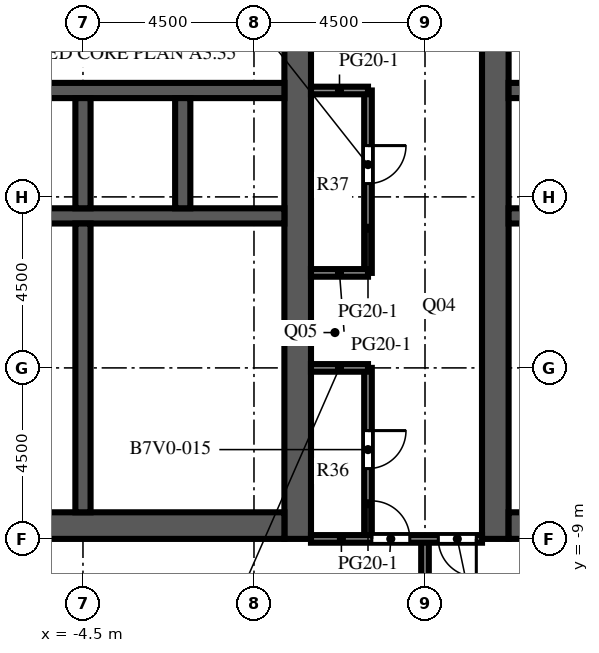
"""IFC4 building model, lengths in metres.
Left out: names, types, materials, properties, quantities, classifications, styles, units other than length and angle.
Written with IfcOpenShell. Run it as: python <this file> out.ifc"""

import sys

from ifc_helpers import new_model, si_unit, direction, frame, frame_2d, origin, place, context, subcontext, project, spatial, rectangle, extrude, element, fill, save


model = new_model("IFC4")
c1 = context("Model", 3, precision=1e-05, world=origin(), true_north=direction((0.0, 1.0)))
c2 = subcontext(c1, "Body", "Model", "MODEL_VIEW")
j1 = project(units=[si_unit("LENGTHUNIT", "METRE"), si_unit("PLANEANGLEUNIT", "RADIAN")], contexts=[c1])
p1 = place(None, origin())
s1 = spatial("IfcSite", under=j1, at=p1, CompositionType="ELEMENT")
p2 = place(p1, origin())
s2 = spatial("IfcBuilding", under=s1, at=p2, CompositionType="ELEMENT")
p3 = place(p2, frame((0.0, 0.0, 235.7)))
s3 = spatial("IfcBuildingStorey", under=s2, at=p3, CompositionType="ELEMENT", Elevation=235.7)
p4 = place(p3, frame((1.15, -9.0, 0.0), z_axis=(0.0, 0.0, 1.0), x_axis=(0.0, 1.0, 0.0)))
e1 = element("IfcWall", 1, at=p4, inside=s3, PredefinedType="SHEAR", context=c2, shape_type="SweptSolid", body=[
    extrude(rectangle(XDim=27.5, YDim=0.7, at=frame_2d((13.75, 0.0))), origin(), (0.0, 0.0, 1.0), 4.1),
])
p5 = place(p4, frame((12.55, 0.0, 0.0)))
e2 = element("IfcOpeningElement", 2, at=p5, cuts=e1, PredefinedType="OPENING", context=c2, shape_type="SweptSolid", body=[
    extrude(rectangle(XDim=2.4, YDim=2.4, at=frame_2d((1.2, 1.2))), frame((0.0, 0.36, 0.0), z_axis=(0.0, -1.0, 0.0), x_axis=(1.0, 0.0, 0.0)), (0.0, 0.0, 1.0), 0.72),
])
p6 = place(p4, frame((5.42, 0.0, 0.0)))
e3 = element("IfcOpeningElement", 3, at=p6, cuts=e1, PredefinedType="OPENING", context=c2, shape_type="SweptSolid", body=[
    extrude(rectangle(XDim=1.2, YDim=2.1, at=frame_2d((0.6, 1.05))), frame((0.0, 0.36, 0.0), z_axis=(0.0, -1.0, 0.0), x_axis=(1.0, 0.0, 0.0)), (0.0, 0.0, 1.0), 0.72),
])
p7 = place(p4, frame((19.46, 0.0, 0.0)))
e4 = element("IfcOpeningElement", 4, at=p7, cuts=e1, PredefinedType="OPENING", context=c2, shape_type="SweptSolid", body=[
    extrude(rectangle(XDim=1.0, YDim=2.1, at=frame_2d((0.5, 1.05))), frame((0.0, 0.36, 0.0), z_axis=(0.0, -1.0, 0.0), x_axis=(1.0, 0.0, 0.0)), (0.0, 0.0, 1.0), 0.72),
])
p8 = place(p4, frame((21.17, 0.0, 0.0)))
e5 = element("IfcOpeningElement", 5, at=p8, cuts=e1, PredefinedType="OPENING", context=c2, shape_type="SweptSolid", body=[
    extrude(rectangle(XDim=1.0, YDim=2.1, at=frame_2d((0.5, 1.05))), frame((0.0, 0.36, 0.0), z_axis=(0.0, -1.0, 0.0), x_axis=(1.0, 0.0, 0.0)), (0.0, 0.0, 1.0), 0.72),
])
p9 = place(p4, frame((23.26, 0.0, 0.0)))
e6 = element("IfcOpeningElement", 6, at=p9, cuts=e1, PredefinedType="OPENING", context=c2, shape_type="SweptSolid", body=[
    extrude(rectangle(XDim=1.0, YDim=2.1, at=frame_2d((0.5, 1.05))), frame((0.0, 0.36, 0.0), z_axis=(0.0, -1.0, 0.0), x_axis=(1.0, 0.0, 0.0)), (0.0, 0.0, 1.0), 0.72),
])
p10 = place(p4, frame((25.35, 0.0, 0.0)))
e7 = element("IfcOpeningElement", 7, at=p10, cuts=e1, PredefinedType="OPENING", context=c2, shape_type="SweptSolid", body=[
    extrude(rectangle(XDim=1.0, YDim=2.1, at=frame_2d((0.5, 1.05))), frame((0.0, 0.36, 0.0), z_axis=(0.0, -1.0, 0.0), x_axis=(1.0, 0.0, 0.0)), (0.0, 0.0, 1.0), 0.72),
])
p11 = place(p3, frame((-9.8, -8.65, 0.0), z_axis=(0.0, 0.0, 1.0), x_axis=(1.0, 0.0, 0.0)))
e8 = element("IfcWall", 8, at=p11, inside=s3, PredefinedType="SHEAR", context=c2, shape_type="SweptSolid", body=[
    extrude(rectangle(XDim=10.6, YDim=0.7, at=frame_2d((5.3, 0.0))), origin(), (0.0, 0.0, 1.0), 4.1),
])
p12 = place(p3, frame((-9.8, -0.5, 0.0), z_axis=(0.0, 0.0, 1.0), x_axis=(1.0, 0.0, 0.0)))
e9 = element("IfcWall", 9, at=p12, inside=s3, PredefinedType="SHEAR", context=c2, shape_type="SweptSolid", body=[
    extrude(rectangle(XDim=10.6, YDim=0.4, at=frame_2d((5.3, 0.0))), origin(), (0.0, 0.0, 1.0), 4.1),
])
p13 = place(p3, frame((-9.8, 2.8, 0.0), z_axis=(0.0, 0.0, 1.0), x_axis=(1.0, 0.0, 0.0)))
e10 = element("IfcWall", 10, at=p13, inside=s3, PredefinedType="SHEAR", context=c2, shape_type="SweptSolid", body=[
    extrude(rectangle(XDim=10.6, YDim=0.4, at=frame_2d((5.3, 0.0))), origin(), (0.0, 0.0, 1.0), 4.1),
])
p14 = place(p13, frame((0.688, 0.0, 0.0)))
e11 = element("IfcOpeningElement", 11, at=p14, cuts=e10, PredefinedType="OPENING", context=c2, shape_type="SweptSolid", body=[
    extrude(rectangle(XDim=1.1, YDim=2.1, at=frame_2d((0.55, 1.05))), frame((0.0, 0.21, 0.0), z_axis=(0.0, -1.0, 0.0), x_axis=(1.0, 0.0, 0.0)), (0.0, 0.0, 1.0), 0.42),
])
p15 = place(p13, frame((3.438, 0.0, 0.0)))
e12 = element("IfcOpeningElement", 12, at=p15, cuts=e10, PredefinedType="OPENING", context=c2, shape_type="SweptSolid", body=[
    extrude(rectangle(XDim=1.1, YDim=2.1, at=frame_2d((0.55, 1.05))), frame((0.0, 0.21, 0.0), z_axis=(0.0, -1.0, 0.0), x_axis=(1.0, 0.0, 0.0)), (0.0, 0.0, 1.0), 0.42),
])
p16 = place(p13, frame((6.113, 0.0, 0.0)))
e13 = element("IfcOpeningElement", 13, at=p16, cuts=e10, PredefinedType="OPENING", context=c2, shape_type="SweptSolid", body=[
    extrude(rectangle(XDim=1.0, YDim=2.1, at=frame_2d((0.5, 1.05))), frame((0.0, 0.21, 0.0), z_axis=(0.0, -1.0, 0.0), x_axis=(1.0, 0.0, 0.0)), (0.0, 0.0, 1.0), 0.42),
])
p17 = place(p13, frame((8.863, 0.0, 0.0)))
e14 = element("IfcOpeningElement", 14, at=p17, cuts=e10, PredefinedType="OPENING", context=c2, shape_type="SweptSolid", body=[
    extrude(rectangle(XDim=1.0, YDim=2.1, at=frame_2d((0.5, 1.05))), frame((0.0, 0.21, 0.0), z_axis=(0.0, -1.0, 0.0), x_axis=(1.0, 0.0, 0.0)), (0.0, 0.0, 1.0), 0.42),
])
for number, where, z_axis, x_axis in (
    (15, (-4.5, -0.3, 0.0), (0.0, 0.0, 1.0), (0.0, 1.0, 0.0)),
    (16, (-1.875, -0.3, 0.0), (0.0, 0.0, 1.0), (0.0, 1.0, 0.0)),
):
    element("IfcWall", number, at=place(p3, frame(where, z_axis=z_axis, x_axis=x_axis)), inside=s3, PredefinedType="SHEAR", context=c2, shape_type="SweptSolid", body=[
        extrude(rectangle(XDim=2.9, YDim=0.4, at=frame_2d((1.45, 0.0))), origin(), (0.0, 0.0, 1.0), 4.1),
    ])
p18 = place(p3, frame((-4.5, -8.3, 0.0), z_axis=(0.0, 0.0, 1.0), x_axis=(0.0, 1.0, 0.0)))
e17 = element("IfcWall", 17, at=p18, inside=s3, PredefinedType="SHEAR", context=c2, shape_type="SweptSolid", body=[
    extrude(rectangle(XDim=7.6, YDim=0.4, at=frame_2d((3.8, 0.0))), origin(), (0.0, 0.0, 1.0), 4.1),
])
p19 = place(p3, frame((6.35, -9.0, 0.0), z_axis=(0.0, 0.0, 1.0), x_axis=(0.0, 1.0, 0.0)))
e18 = element("IfcWall", 18, at=p19, inside=s3, PredefinedType="SHEAR", context=c2, shape_type="SweptSolid", body=[
    extrude(rectangle(XDim=27.5, YDim=0.7, at=frame_2d((13.75, 0.0))), origin(), (0.0, 0.0, 1.0), 4.1),
])
p20 = place(p19, frame((12.55, 0.0, 0.0)))
e19 = element("IfcOpeningElement", 19, at=p20, cuts=e18, PredefinedType="OPENING", context=c2, shape_type="SweptSolid", body=[
    extrude(rectangle(XDim=2.4, YDim=2.4, at=frame_2d((1.2, 1.2))), frame((0.0, 0.36, 0.0), z_axis=(0.0, -1.0, 0.0), x_axis=(1.0, 0.0, 0.0)), (0.0, 0.0, 1.0), 0.72),
])
p21 = place(p19, frame((5.42, 0.0, 0.0)))
e20 = element("IfcOpeningElement", 20, at=p21, cuts=e18, PredefinedType="OPENING", context=c2, shape_type="SweptSolid", body=[
    extrude(rectangle(XDim=1.2, YDim=2.1, at=frame_2d((0.6, 1.05))), frame((0.0, 0.36, 0.0), z_axis=(0.0, -1.0, 0.0), x_axis=(1.0, 0.0, 0.0)), (0.0, 0.0, 1.0), 0.72),
])
p22 = place(p19, frame((19.46, 0.0, 0.0)))
e21 = element("IfcOpeningElement", 21, at=p22, cuts=e18, PredefinedType="OPENING", context=c2, shape_type="SweptSolid", body=[
    extrude(rectangle(XDim=1.0, YDim=2.1, at=frame_2d((0.5, 1.05))), frame((0.0, 0.36, 0.0), z_axis=(0.0, -1.0, 0.0), x_axis=(1.0, 0.0, 0.0)), (0.0, 0.0, 1.0), 0.72),
])
p23 = place(p19, frame((21.17, 0.0, 0.0)))
e22 = element("IfcOpeningElement", 22, at=p23, cuts=e18, PredefinedType="OPENING", context=c2, shape_type="SweptSolid", body=[
    extrude(rectangle(XDim=1.0, YDim=2.1, at=frame_2d((0.5, 1.05))), frame((0.0, 0.36, 0.0), z_axis=(0.0, -1.0, 0.0), x_axis=(1.0, 0.0, 0.0)), (0.0, 0.0, 1.0), 0.72),
])
p24 = place(p19, frame((23.26, 0.0, 0.0)))
e23 = element("IfcOpeningElement", 23, at=p24, cuts=e18, PredefinedType="OPENING", context=c2, shape_type="SweptSolid", body=[
    extrude(rectangle(XDim=1.0, YDim=2.1, at=frame_2d((0.5, 1.05))), frame((0.0, 0.36, 0.0), z_axis=(0.0, -1.0, 0.0), x_axis=(1.0, 0.0, 0.0)), (0.0, 0.0, 1.0), 0.72),
])
p25 = place(p19, frame((25.35, 0.0, 0.0)))
e24 = element("IfcOpeningElement", 24, at=p25, cuts=e18, PredefinedType="OPENING", context=c2, shape_type="SweptSolid", body=[
    extrude(rectangle(XDim=1.0, YDim=2.1, at=frame_2d((0.5, 1.05))), frame((0.0, 0.36, 0.0), z_axis=(0.0, -1.0, 0.0), x_axis=(1.0, 0.0, 0.0)), (0.0, 0.0, 1.0), 0.72),
])
p26 = place(p3, frame((6.7, -8.65, 0.0), z_axis=(0.0, 0.0, 1.0), x_axis=(1.0, 0.0, 0.0)))
e25 = element("IfcWall", 25, at=p26, inside=s3, PredefinedType="SHEAR", context=c2, shape_type="SweptSolid", body=[
    extrude(rectangle(XDim=10.6, YDim=0.7, at=frame_2d((5.3, 0.0))), origin(), (0.0, 0.0, 1.0), 4.1),
])
p27 = place(p3, frame((6.7, -0.5, 0.0), z_axis=(0.0, 0.0, 1.0), x_axis=(1.0, 0.0, 0.0)))
e26 = element("IfcWall", 26, at=p27, inside=s3, PredefinedType="SHEAR", context=c2, shape_type="SweptSolid", body=[
    extrude(rectangle(XDim=10.6, YDim=0.4, at=frame_2d((5.3, 0.0))), origin(), (0.0, 0.0, 1.0), 4.1),
])
p28 = place(p3, frame((6.7, 2.8, 0.0), z_axis=(0.0, 0.0, 1.0), x_axis=(1.0, 0.0, 0.0)))
e27 = element("IfcWall", 27, at=p28, inside=s3, PredefinedType="SHEAR", context=c2, shape_type="SweptSolid", body=[
    extrude(rectangle(XDim=10.6, YDim=0.4, at=frame_2d((5.3, 0.0))), origin(), (0.0, 0.0, 1.0), 4.1),
])
p29 = place(p28, frame((0.688, 0.0, 0.0)))
e28 = element("IfcOpeningElement", 28, at=p29, cuts=e27, PredefinedType="OPENING", context=c2, shape_type="SweptSolid", body=[
    extrude(rectangle(XDim=1.1, YDim=2.1, at=frame_2d((0.55, 1.05))), frame((0.0, 0.21, 0.0), z_axis=(0.0, -1.0, 0.0), x_axis=(1.0, 0.0, 0.0)), (0.0, 0.0, 1.0), 0.42),
])
p30 = place(p28, frame((3.438, 0.0, 0.0)))
e29 = element("IfcOpeningElement", 29, at=p30, cuts=e27, PredefinedType="OPENING", context=c2, shape_type="SweptSolid", body=[
    extrude(rectangle(XDim=1.1, YDim=2.1, at=frame_2d((0.55, 1.05))), frame((0.0, 0.21, 0.0), z_axis=(0.0, -1.0, 0.0), x_axis=(1.0, 0.0, 0.0)), (0.0, 0.0, 1.0), 0.42),
])
p31 = place(p28, frame((6.113, 0.0, 0.0)))
e30 = element("IfcOpeningElement", 30, at=p31, cuts=e27, PredefinedType="OPENING", context=c2, shape_type="SweptSolid", body=[
    extrude(rectangle(XDim=1.0, YDim=2.1, at=frame_2d((0.5, 1.05))), frame((0.0, 0.21, 0.0), z_axis=(0.0, -1.0, 0.0), x_axis=(1.0, 0.0, 0.0)), (0.0, 0.0, 1.0), 0.42),
])
p32 = place(p28, frame((8.863, 0.0, 0.0)))
e31 = element("IfcOpeningElement", 31, at=p32, cuts=e27, PredefinedType="OPENING", context=c2, shape_type="SweptSolid", body=[
    extrude(rectangle(XDim=1.0, YDim=2.1, at=frame_2d((0.5, 1.05))), frame((0.0, 0.21, 0.0), z_axis=(0.0, -1.0, 0.0), x_axis=(1.0, 0.0, 0.0)), (0.0, 0.0, 1.0), 0.42),
])
p33 = place(p3, frame((-0.7, -5.26, 0.0), z_axis=(0.0, 0.0, 1.0), x_axis=(1.0, 0.0, 0.0)))
e32 = element("IfcWall", 32, at=p33, inside=s3, PredefinedType="PARTITIONING", context=c2, shape_type="SweptSolid", body=[
    extrude(rectangle(XDim=1.5, YDim=0.1, at=frame_2d((0.75, 0.0))), origin(), (0.0, 0.0, 1.0), 3.65),
])
p34 = place(p33, frame((0.25, 0.0, 0.0)))
e33 = element("IfcOpeningElement", 33, at=p34, cuts=e32, PredefinedType="OPENING", context=c2, shape_type="SweptSolid", body=[
    extrude(rectangle(XDim=1.0, YDim=2.1, at=frame_2d((0.5, 1.05))), frame((0.0, 0.06, 0.0), z_axis=(0.0, -1.0, 0.0), x_axis=(1.0, 0.0, 0.0)), (0.0, 0.0, 1.0), 0.12),
])
p35 = place(p3, frame((-0.7, -5.26, 0.0), z_axis=(0.0, 0.0, 1.0), x_axis=(0.0, 1.0, 0.0)))
e34 = element("IfcWall", 34, at=p35, inside=s3, PredefinedType="PARTITIONING", context=c2, shape_type="SweptSolid", body=[
    extrude(rectangle(XDim=2.28, YDim=0.1, at=frame_2d((1.14, 0.0))), origin(), (0.0, 0.0, 1.0), 3.65),
])
p36 = place(p35, frame((0.64, 0.0, 0.0)))
e35 = element("IfcOpeningElement", 35, at=p36, cuts=e34, PredefinedType="OPENING", context=c2, shape_type="SweptSolid", body=[
    extrude(rectangle(XDim=1.0, YDim=2.1, at=frame_2d((0.5, 1.05))), frame((0.0, 0.06, 0.0), z_axis=(0.0, -1.0, 0.0), x_axis=(1.0, 0.0, 0.0)), (0.0, 0.0, 1.0), 0.12),
])
p37 = place(p3, frame((-0.7, -2.98, 0.0), z_axis=(0.0, 0.0, 1.0), x_axis=(0.0, 1.0, 0.0)))
e36 = element("IfcWall", 36, at=p37, inside=s3, PredefinedType="PARTITIONING", context=c2, shape_type="SweptSolid", body=[
    extrude(rectangle(XDim=2.28, YDim=0.1, at=frame_2d((1.14, 0.0))), origin(), (0.0, 0.0, 1.0), 3.65),
])
p38 = place(p37, frame((0.64, 0.0, 0.0)))
e37 = element("IfcOpeningElement", 37, at=p38, cuts=e36, PredefinedType="OPENING", context=c2, shape_type="SweptSolid", body=[
    extrude(rectangle(XDim=1.0, YDim=2.1, at=frame_2d((0.5, 1.05))), frame((0.0, 0.06, 0.0), z_axis=(0.0, -1.0, 0.0), x_axis=(1.0, 0.0, 0.0)), (0.0, 0.0, 1.0), 0.12),
])
for number, where, z_axis, x_axis in (
    (38, (-4.3, -5.26, 0.0), (0.0, 0.0, 1.0), (1.0, 0.0, 0.0)),
    (39, (-4.3, -2.98, 0.0), (0.0, 0.0, 1.0), (1.0, 0.0, 0.0)),
):
    element("IfcWall", number, at=place(p3, frame(where, z_axis=z_axis, x_axis=x_axis)), inside=s3, PredefinedType="PARTITIONING", context=c2, shape_type="SweptSolid", body=[
        extrude(rectangle(XDim=3.6, YDim=0.1, at=frame_2d((1.8, 0.0))), origin(), (0.0, 0.0, 1.0), 3.65),
    ])
p39 = place(p3, frame((6.7, -5.26, 0.0), z_axis=(0.0, 0.0, 1.0), x_axis=(1.0, 0.0, 0.0)))
e40 = element("IfcWall", 40, at=p39, inside=s3, PredefinedType="PARTITIONING", context=c2, shape_type="SweptSolid", body=[
    extrude(rectangle(XDim=1.5, YDim=0.1, at=frame_2d((0.75, 0.0))), origin(), (0.0, 0.0, 1.0), 3.65),
])
p40 = place(p39, frame((0.25, 0.0, 0.0)))
e41 = element("IfcOpeningElement", 41, at=p40, cuts=e40, PredefinedType="OPENING", context=c2, shape_type="SweptSolid", body=[
    extrude(rectangle(XDim=1.0, YDim=2.1, at=frame_2d((0.5, 1.05))), frame((0.0, 0.06, 0.0), z_axis=(0.0, -1.0, 0.0), x_axis=(1.0, 0.0, 0.0)), (0.0, 0.0, 1.0), 0.12),
])
p41 = place(p3, frame((3.0, -9.0, 0.0), z_axis=(0.0, 0.0, 1.0), x_axis=(0.0, 1.0, 0.0)))
e42 = element("IfcWall", 42, at=p41, inside=s3, PredefinedType="PARTITIONING", context=c2, shape_type="SweptSolid", body=[
    extrude(rectangle(XDim=4.5, YDim=0.2, at=frame_2d((2.25, 0.0))), origin(), (0.0, 0.0, 1.0), 3.65),
])
p42 = place(p41, frame((1.85, 0.0, 0.0)))
e43 = element("IfcOpeningElement", 43, at=p42, cuts=e42, PredefinedType="OPENING", context=c2, shape_type="SweptSolid", body=[
    extrude(rectangle(XDim=1.0, YDim=2.1, at=frame_2d((0.5, 1.05))), frame((0.0, 0.11, 0.0), z_axis=(0.0, -1.0, 0.0), x_axis=(1.0, 0.0, 0.0)), (0.0, 0.0, 1.0), 0.22),
])
p43 = place(p3, frame((3.0, -2.0, 0.0), z_axis=(0.0, 0.0, 1.0), x_axis=(0.0, 1.0, 0.0)))
e44 = element("IfcWall", 44, at=p43, inside=s3, PredefinedType="PARTITIONING", context=c2, shape_type="SweptSolid", body=[
    extrude(rectangle(XDim=4.8, YDim=0.2, at=frame_2d((2.4, 0.0))), origin(), (0.0, 0.0, 1.0), 3.65),
])
p44 = place(p43, frame((2.35, 0.0, 0.0)))
e45 = element("IfcOpeningElement", 45, at=p44, cuts=e44, PredefinedType="OPENING", context=c2, shape_type="SweptSolid", body=[
    extrude(rectangle(XDim=1.0, YDim=2.1, at=frame_2d((0.5, 1.05))), frame((0.0, 0.11, 0.0), z_axis=(0.0, -1.0, 0.0), x_axis=(1.0, 0.0, 0.0)), (0.0, 0.0, 1.0), 0.22),
])
p45 = place(p3, frame((4.5, -22.1, 0.0), z_axis=(0.0, 0.0, 1.0), x_axis=(0.0, 1.0, 0.0)))
e46 = element("IfcWall", 46, at=p45, inside=s3, PredefinedType="PARTITIONING", context=c2, shape_type="SweptSolid", body=[
    extrude(rectangle(XDim=13.1, YDim=0.2, at=frame_2d((6.55, 0.0))), origin(), (0.0, 0.0, 1.0), 3.65),
])
p46 = place(p3, frame((6.0, -9.0, 0.0), z_axis=(0.0, 0.0, 1.0), x_axis=(-1.0, 0.0, 0.0)))
e47 = element("IfcWall", 47, at=p46, inside=s3, PredefinedType="PARTITIONING", context=c2, shape_type="SweptSolid", body=[
    extrude(rectangle(XDim=4.5, YDim=0.2, at=frame_2d((2.25, 0.0))), origin(), (0.0, 0.0, 1.0), 3.65),
])
p47 = place(p46, frame((1.9, 0.0, 0.0)))
e48 = element("IfcOpeningElement", 48, at=p47, cuts=e47, PredefinedType="OPENING", context=c2, shape_type="SweptSolid", body=[
    extrude(rectangle(XDim=1.0, YDim=2.1, at=frame_2d((0.5, 1.05))), frame((0.0, 0.11, 0.0), z_axis=(0.0, -1.0, 0.0), x_axis=(1.0, 0.0, 0.0)), (0.0, 0.0, 1.0), 0.22),
])
p48 = place(p46, frame((0.15, 0.0, 0.0)))
e49 = element("IfcOpeningElement", 49, at=p48, cuts=e47, PredefinedType="OPENING", context=c2, shape_type="SweptSolid", body=[
    extrude(rectangle(XDim=1.0, YDim=2.1, at=frame_2d((0.5, 1.05))), frame((0.0, 0.11, 0.0), z_axis=(0.0, -1.0, 0.0), x_axis=(1.0, 0.0, 0.0)), (0.0, 0.0, 1.0), 0.22),
])
for number, where, z_axis, x_axis in (
    (50, (1.5, -4.5, 0.0), (0.0, 0.0, 1.0), (1.0, 0.0, 0.0)),
    (51, (1.5, -2.0, 0.0), (0.0, 0.0, 1.0), (1.0, 0.0, 0.0)),
    (52, (1.5, 2.8, 0.0), (0.0, 0.0, 1.0), (1.0, 0.0, 0.0)),
):
    element("IfcWall", number, at=place(p3, frame(where, z_axis=z_axis, x_axis=x_axis)), inside=s3, PredefinedType="PARTITIONING", context=c2, shape_type="SweptSolid", body=[
        extrude(rectangle(XDim=1.5, YDim=0.2, at=frame_2d((0.75, 0.0))), origin(), (0.0, 0.0, 1.0), 3.65),
    ])
p49 = place(p15, origin())
e53 = element("IfcDoor", 53, at=p49, inside=s3, OperationType="DOUBLE_DOOR_SLIDING", PredefinedType="DOOR", context=c2, shape_type="SweptSolid", body=[
    extrude(rectangle(XDim=1.1, YDim=2.1, at=frame_2d((0.55, 1.05))), frame((0.0, 0.025, 0.0), z_axis=(0.0, -1.0, 0.0), x_axis=(1.0, 0.0, 0.0)), (0.0, 0.0, 1.0), 0.05),
])
fill(e12, e53)
p50 = place(p5, origin())
e54 = element("IfcDoor", 54, at=p50, inside=s3, OperationType="DOUBLE_DOOR_DOUBLE_SWING", PredefinedType="DOOR", context=c2, shape_type="SweptSolid", body=[
    extrude(rectangle(XDim=2.4, YDim=2.4, at=frame_2d((1.2, 1.2))), frame((0.0, 0.025, 0.0), z_axis=(0.0, -1.0, 0.0), x_axis=(1.0, 0.0, 0.0)), (0.0, 0.0, 1.0), 0.05),
])
fill(e2, e54)
p51 = place(p20, origin())
e55 = element("IfcDoor", 55, at=p51, inside=s3, OperationType="DOUBLE_DOOR_DOUBLE_SWING", PredefinedType="DOOR", context=c2, shape_type="SweptSolid", body=[
    extrude(rectangle(XDim=2.4, YDim=2.4, at=frame_2d((1.2, 1.2))), frame((0.0, 0.025, 0.0), z_axis=(0.0, -1.0, 0.0), x_axis=(1.0, 0.0, 0.0)), (0.0, 0.0, 1.0), 0.05),
])
fill(e19, e55)
p52 = place(p16, origin())
e56 = element("IfcDoor", 56, at=p52, inside=s3, OperationType="SINGLE_SWING_LEFT", PredefinedType="DOOR", context=c2, shape_type="SweptSolid", body=[
    extrude(rectangle(XDim=1.0, YDim=2.1, at=frame_2d((0.5, 1.05))), frame((0.0, 0.025, 0.0), z_axis=(0.0, -1.0, 0.0), x_axis=(1.0, 0.0, 0.0)), (0.0, 0.0, 1.0), 0.05),
])
fill(e13, e56)
p53 = place(p17, origin())
e57 = element("IfcDoor", 57, at=p53, inside=s3, OperationType="SINGLE_SWING_RIGHT", PredefinedType="DOOR", context=c2, shape_type="SweptSolid", body=[
    extrude(rectangle(XDim=1.0, YDim=2.1, at=frame_2d((0.5, 1.05))), frame((0.0, 0.025, 0.0), z_axis=(0.0, -1.0, 0.0), x_axis=(1.0, 0.0, 0.0)), (0.0, 0.0, 1.0), 0.05),
])
fill(e14, e57)
p54 = place(p6, origin())
e58 = element("IfcDoor", 58, at=p54, inside=s3, OperationType="SINGLE_SWING_LEFT", PredefinedType="DOOR", context=c2, shape_type="SweptSolid", body=[
    extrude(rectangle(XDim=1.2, YDim=2.1, at=frame_2d((0.6, 1.05))), frame((0.0, 0.325, 0.0), z_axis=(0.0, -1.0, 0.0), x_axis=(1.0, 0.0, 0.0)), (0.0, 0.0, 1.0), 0.05),
])
fill(e3, e58)
p55 = place(p34, origin())
e59 = element("IfcDoor", 59, at=p55, inside=s3, OperationType="SINGLE_SWING_RIGHT", PredefinedType="DOOR", context=c2, shape_type="SweptSolid", body=[
    extrude(rectangle(XDim=1.0, YDim=2.1, at=frame_2d((0.5, 1.05))), frame((0.0, 0.025, 0.0), z_axis=(0.0, -1.0, 0.0), x_axis=(1.0, 0.0, 0.0)), (0.0, 0.0, 1.0), 0.05),
])
fill(e33, e59)
p56 = place(p36, origin())
e60 = element("IfcDoor", 60, at=p56, inside=s3, OperationType="SINGLE_SWING_LEFT", PredefinedType="DOOR", context=c2, shape_type="SweptSolid", body=[
    extrude(rectangle(XDim=1.0, YDim=2.1, at=frame_2d((0.5, 1.05))), frame((0.0, 0.025, 0.0), z_axis=(0.0, -1.0, 0.0), x_axis=(1.0, 0.0, 0.0)), (0.0, 0.0, 1.0), 0.05),
])
fill(e35, e60)
p57 = place(p38, origin())
e61 = element("IfcDoor", 61, at=p57, inside=s3, OperationType="SINGLE_SWING_RIGHT", PredefinedType="DOOR", context=c2, shape_type="SweptSolid", body=[
    extrude(rectangle(XDim=1.0, YDim=2.1, at=frame_2d((0.5, 1.05))), frame((0.0, 0.025, 0.0), z_axis=(0.0, -1.0, 0.0), x_axis=(1.0, 0.0, 0.0)), (0.0, 0.0, 1.0), 0.05),
])
fill(e37, e61)
p58 = place(p21, origin())
e62 = element("IfcDoor", 62, at=p58, inside=s3, OperationType="SINGLE_SWING_RIGHT", PredefinedType="DOOR", context=c2, shape_type="SweptSolid", body=[
    extrude(rectangle(XDim=1.2, YDim=2.1, at=frame_2d((0.6, 1.05))), frame((0.0, -0.275, 0.0), z_axis=(0.0, -1.0, 0.0), x_axis=(1.0, 0.0, 0.0)), (0.0, 0.0, 1.0), 0.05),
])
fill(e20, e62)
p59 = place(p40, origin())
e63 = element("IfcDoor", 63, at=p59, inside=s3, OperationType="SINGLE_SWING_LEFT", PredefinedType="DOOR", context=c2, shape_type="SweptSolid", body=[
    extrude(rectangle(XDim=1.0, YDim=2.1, at=frame_2d((0.5, 1.05))), frame((0.0, 0.025, 0.0), z_axis=(0.0, -1.0, 0.0), x_axis=(1.0, 0.0, 0.0)), (0.0, 0.0, 1.0), 0.05),
])
fill(e41, e63)
p60 = place(p47, origin())
e64 = element("IfcDoor", 64, at=p60, inside=s3, OperationType="SINGLE_SWING_RIGHT", PredefinedType="DOOR", context=c2, shape_type="SweptSolid", body=[
    extrude(rectangle(XDim=1.0, YDim=2.1, at=frame_2d((0.5, 1.05))), frame((0.0, 0.025, 0.0), z_axis=(0.0, -1.0, 0.0), x_axis=(1.0, 0.0, 0.0)), (0.0, 0.0, 1.0), 0.05),
])
fill(e48, e64)
p61 = place(p48, origin())
e65 = element("IfcDoor", 65, at=p61, inside=s3, OperationType="SINGLE_SWING_LEFT", PredefinedType="DOOR", context=c2, shape_type="SweptSolid", body=[
    extrude(rectangle(XDim=1.0, YDim=2.1, at=frame_2d((0.5, 1.05))), frame((0.0, 0.025, 0.0), z_axis=(0.0, -1.0, 0.0), x_axis=(1.0, 0.0, 0.0)), (0.0, 0.0, 1.0), 0.05),
])
fill(e49, e65)
p62 = place(p42, origin())
e66 = element("IfcDoor", 66, at=p62, inside=s3, OperationType="SINGLE_SWING_RIGHT", PredefinedType="DOOR", context=c2, shape_type="SweptSolid", body=[
    extrude(rectangle(XDim=1.0, YDim=2.1, at=frame_2d((0.5, 1.05))), frame((0.0, 0.025, 0.0), z_axis=(0.0, -1.0, 0.0), x_axis=(1.0, 0.0, 0.0)), (0.0, 0.0, 1.0), 0.05),
])
fill(e43, e66)
p63 = place(p44, origin())
e67 = element("IfcDoor", 67, at=p63, inside=s3, OperationType="SINGLE_SWING_RIGHT", PredefinedType="DOOR", context=c2, shape_type="SweptSolid", body=[
    extrude(rectangle(XDim=1.0, YDim=2.1, at=frame_2d((0.5, 1.05))), frame((0.0, 0.025, 0.0), z_axis=(0.0, -1.0, 0.0), x_axis=(1.0, 0.0, 0.0)), (0.0, 0.0, 1.0), 0.05),
])
fill(e45, e67)
save(model, sys.argv[1])
